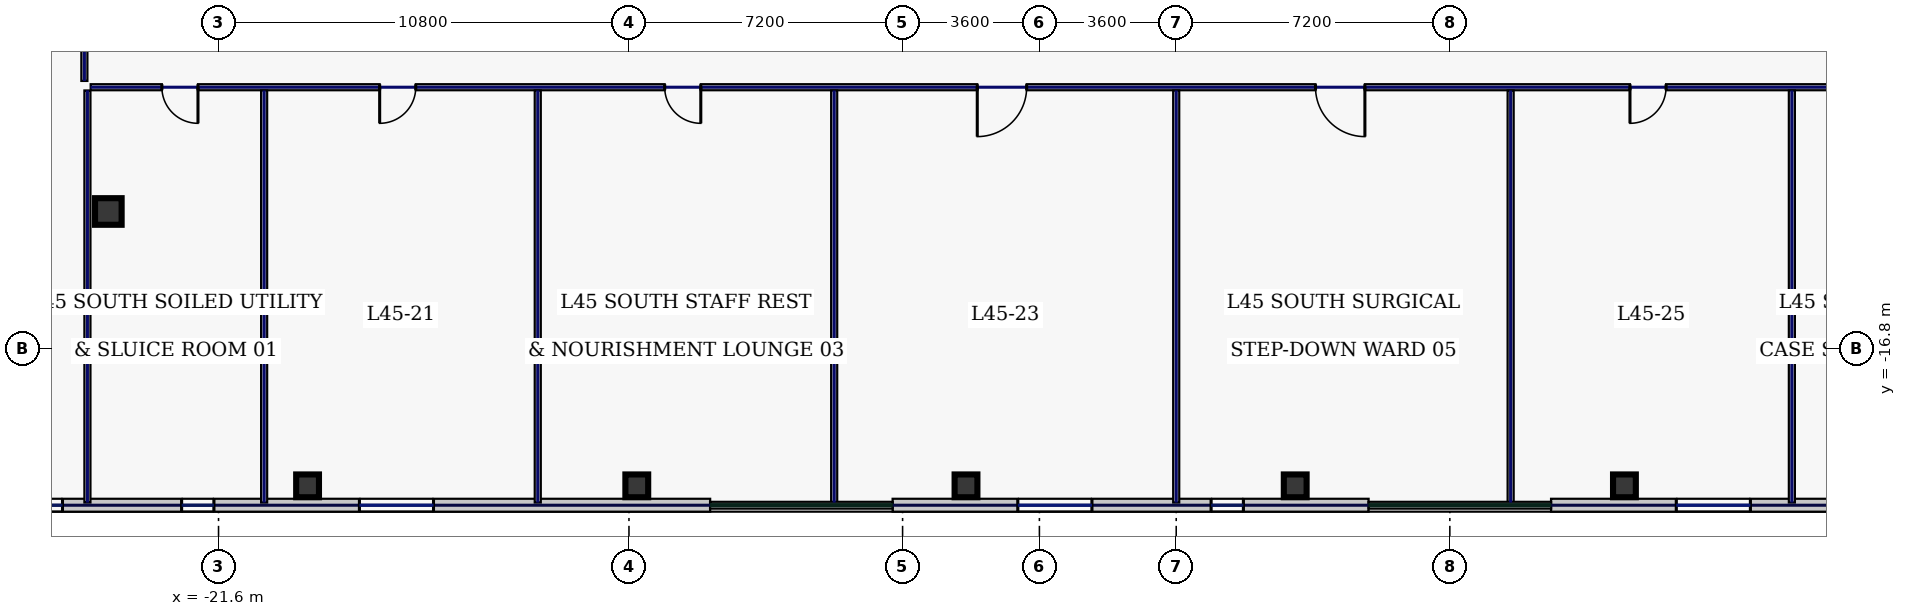
"""IFC4 building model, lengths in metres.
Left out: names, types, materials, properties, quantities, classifications, styles, units other than length and angle.
Written with IfcOpenShell. Run it as: python <this file> out.ifc"""

import sys

from ifc_helpers import new_model, si_unit, direction, frame, frame_2d, origin, origin_2d, place, context, subcontext, project, spatial, rectangle, hollow_rectangle, extrude, element, fill, save


model = new_model("IFC4")
c1 = context("Model", 3, precision=1e-05, world=origin(), true_north=direction((0.0, 1.0)))
c2 = subcontext(c1, "Body", "Model", "MODEL_VIEW")
j1 = project(units=[si_unit("LENGTHUNIT", "METRE"), si_unit("PLANEANGLEUNIT", "RADIAN")], contexts=[c1])
p1 = place(None, origin())
s1 = spatial("IfcSite", under=j1, at=p1, CompositionType="ELEMENT")
p2 = place(p1, origin())
s2 = spatial("IfcBuilding", under=s1, at=p2, CompositionType="ELEMENT")
p3 = place(p2, frame((0.0, 0.0, 196.2)))
s3 = spatial("IfcBuildingStorey", under=s2, at=p3, CompositionType="ELEMENT", Elevation=196.2)
p4 = place(p3, frame((-24.5, -13.2, 0.0), z_axis=(0.0, 0.0, 1.0), x_axis=(1.0, 0.0, 0.0)))
e1 = element("IfcColumn", 1, at=p4, inside=s3, PredefinedType="COLUMN", context=c2, shape_type="SweptSolid", body=[
    extrude(hollow_rectangle(XDim=0.7, YDim=0.7, WallThickness=0.032, at=origin_2d()), origin(), (0.0, 0.0, 1.0), 3.74),
])
for number, where, z_axis, x_axis in (
    (2, (-19.257, -20.42, 0.0), (0.0, 0.0, 1.0), (1.0, 0.0, 0.0)),
    (3, (-10.594, -20.42, 0.0), (0.0, 0.0, 1.0), (1.0, 0.0, 0.0)),
    (4, (-1.931, -20.42, 0.0), (0.0, 0.0, 1.0), (1.0, 0.0, 0.0)),
    (5, (6.731, -20.42, 0.0), (0.0, 0.0, 1.0), (1.0, 0.0, 0.0)),
    (6, (15.394, -20.42, 0.0), (0.0, 0.0, 1.0), (1.0, 0.0, 0.0)),
):
    element("IfcColumn", number, at=place(p3, frame(where, z_axis=z_axis, x_axis=x_axis)), inside=s3, PredefinedType="COLUMN", context=c2, shape_type="SweptSolid", body=[
        extrude(hollow_rectangle(XDim=0.6, YDim=0.6, WallThickness=0.028, at=origin_2d()), origin(), (0.0, 0.0, 1.0), 3.74),
    ])
p5 = place(p3, frame((-28.6, -20.93, 0.0), z_axis=(0.0, 0.0, 1.0), x_axis=(1.0, 0.0, 0.0)))
e7 = element("IfcWall", 7, at=p5, inside=s3, PredefinedType="STANDARD", context=c2, shape_type="SweptSolid", body=[
    extrude(rectangle(XDim=19.937, YDim=0.34, at=frame_2d((9.969, 0.0))), origin(), (0.0, 0.0, 1.0), 3.74),
])
p6 = place(p5, frame((2.044, 0.0, 0.8)))
e8 = element("IfcOpeningElement", 8, at=p6, cuts=e7, PredefinedType="OPENING", context=c2, shape_type="SweptSolid", body=[
    extrude(rectangle(XDim=0.85, YDim=1.85, at=frame_2d((0.425, 0.925))), frame((0.0, 0.18, 0.0), z_axis=(0.0, -1.0, 0.0), x_axis=(1.0, 0.0, 0.0)), (0.0, 0.0, 1.0), 0.36),
])
p7 = place(p5, frame((6.029, 0.0, 0.8)))
e9 = element("IfcOpeningElement", 9, at=p7, cuts=e7, PredefinedType="OPENING", context=c2, shape_type="SweptSolid", body=[
    extrude(rectangle(XDim=0.85, YDim=1.85, at=frame_2d((0.425, 0.925))), frame((0.0, 0.18, 0.0), z_axis=(0.0, -1.0, 0.0), x_axis=(1.0, 0.0, 0.0)), (0.0, 0.0, 1.0), 0.36),
])
p8 = place(p5, frame((10.707, 0.0, 0.8)))
e10 = element("IfcOpeningElement", 10, at=p8, cuts=e7, PredefinedType="OPENING", context=c2, shape_type="SweptSolid", body=[
    extrude(rectangle(XDim=1.95, YDim=2.1, at=frame_2d((0.975, 1.05))), frame((0.0, 0.18, 0.0), z_axis=(0.0, -1.0, 0.0), x_axis=(1.0, 0.0, 0.0)), (0.0, 0.0, 1.0), 0.36),
])
p9 = place(p3, frame((-3.863, -20.93, 0.0), z_axis=(0.0, 0.0, 1.0), x_axis=(1.0, 0.0, 0.0)))
e11 = element("IfcWall", 11, at=p9, inside=s3, PredefinedType="STANDARD", context=c2, shape_type="SweptSolid", body=[
    extrude(rectangle(XDim=12.526, YDim=0.34, at=frame_2d((6.263, 0.0))), origin(), (0.0, 0.0, 1.0), 3.74),
])
p10 = place(p9, frame((3.295, 0.0, 0.8)))
e12 = element("IfcOpeningElement", 12, at=p10, cuts=e11, PredefinedType="OPENING", context=c2, shape_type="SweptSolid", body=[
    extrude(rectangle(XDim=1.95, YDim=2.1, at=frame_2d((0.975, 1.05))), frame((0.0, 0.18, 0.0), z_axis=(0.0, -1.0, 0.0), x_axis=(1.0, 0.0, 0.0)), (0.0, 0.0, 1.0), 0.36),
])
p11 = place(p9, frame((8.38, 0.0, 0.8)))
e13 = element("IfcOpeningElement", 13, at=p11, cuts=e11, PredefinedType="OPENING", context=c2, shape_type="SweptSolid", body=[
    extrude(rectangle(XDim=0.85, YDim=1.85, at=frame_2d((0.425, 0.925))), frame((0.0, 0.18, 0.0), z_axis=(0.0, -1.0, 0.0), x_axis=(1.0, 0.0, 0.0)), (0.0, 0.0, 1.0), 0.36),
])
p12 = place(p3, frame((13.463, -20.93, 0.0), z_axis=(0.0, 0.0, 1.0), x_axis=(1.0, 0.0, 0.0)))
e14 = element("IfcWall", 14, at=p12, inside=s3, PredefinedType="STANDARD", context=c2, shape_type="SweptSolid", body=[
    extrude(rectangle(XDim=19.937, YDim=0.34, at=frame_2d((9.969, 0.0))), origin(), (0.0, 0.0, 1.0), 3.74),
])
p13 = place(p12, frame((3.295, 0.0, 0.8)))
e15 = element("IfcOpeningElement", 15, at=p13, cuts=e14, PredefinedType="OPENING", context=c2, shape_type="SweptSolid", body=[
    extrude(rectangle(XDim=1.95, YDim=2.1, at=frame_2d((0.975, 1.05))), frame((0.0, 0.18, 0.0), z_axis=(0.0, -1.0, 0.0), x_axis=(1.0, 0.0, 0.0)), (0.0, 0.0, 1.0), 0.36),
])
p14 = place(p12, frame((7.28, 0.0, 0.8)))
e16 = element("IfcOpeningElement", 16, at=p14, cuts=e14, PredefinedType="OPENING", context=c2, shape_type="SweptSolid", body=[
    extrude(rectangle(XDim=1.95, YDim=2.1, at=frame_2d((0.975, 1.05))), frame((0.0, 0.18, 0.0), z_axis=(0.0, -1.0, 0.0), x_axis=(1.0, 0.0, 0.0)), (0.0, 0.0, 1.0), 0.36),
])
p15 = place(p12, frame((13.058, 0.0, 0.8)))
e17 = element("IfcOpeningElement", 17, at=p15, cuts=e14, PredefinedType="OPENING", context=c2, shape_type="SweptSolid", body=[
    extrude(rectangle(XDim=0.85, YDim=1.85, at=frame_2d((0.425, 0.925))), frame((0.0, 0.18, 0.0), z_axis=(0.0, -1.0, 0.0), x_axis=(1.0, 0.0, 0.0)), (0.0, 0.0, 1.0), 0.36),
])
p16 = place(p12, frame((15.943, 0.0, 0.8)))
e18 = element("IfcOpeningElement", 18, at=p16, cuts=e14, PredefinedType="OPENING", context=c2, shape_type="SweptSolid", body=[
    extrude(rectangle(XDim=1.95, YDim=2.1, at=frame_2d((0.975, 1.05))), frame((0.0, 0.18, 0.0), z_axis=(0.0, -1.0, 0.0), x_axis=(1.0, 0.0, 0.0)), (0.0, 0.0, 1.0), 0.36),
])
p17 = place(p3, frame((-25.13, -9.765, 0.0), z_axis=(0.0, 0.0, 1.0), x_axis=(0.0, 1.0, 0.0)))
e19 = element("IfcWall", 19, at=p17, inside=s3, PredefinedType="PARTITIONING", context=c2, shape_type="SweptSolid", body=[
    extrude(rectangle(XDim=2.98, YDim=0.16, at=frame_2d((1.49, 0.0))), origin(), (0.0, 0.0, 1.0), 3.74),
])
p18 = place(p17, frame((1.1, 0.0, 0.0)))
e20 = element("IfcOpeningElement", 20, at=p18, cuts=e19, PredefinedType="OPENING", context=c2, shape_type="SweptSolid", body=[
    extrude(rectangle(XDim=0.95, YDim=2.2, at=frame_2d((0.475, 1.1))), frame((0.0, 0.09, 0.0), z_axis=(0.0, -1.0, 0.0), x_axis=(1.0, 0.0, 0.0)), (0.0, 0.0, 1.0), 0.18),
])
p19 = place(p3, frame((24.965, -9.93, 0.0), z_axis=(0.0, 0.0, 1.0), x_axis=(-1.0, 0.0, 0.0)))
e21 = element("IfcWall", 21, at=p19, inside=s3, PredefinedType="PARTITIONING", context=c2, shape_type="SweptSolid", body=[
    extrude(rectangle(XDim=49.93, YDim=0.16, at=frame_2d((24.965, 0.0))), origin(), (0.0, 0.0, 1.0), 3.74),
])
p20 = place(p19, frame((47.106, 0.0, 0.0)))
e22 = element("IfcOpeningElement", 22, at=p20, cuts=e21, PredefinedType="OPENING", context=c2, shape_type="SweptSolid", body=[
    extrude(rectangle(XDim=0.95, YDim=2.2, at=frame_2d((0.475, 1.1))), frame((0.0, 0.09, 0.0), z_axis=(0.0, -1.0, 0.0), x_axis=(1.0, 0.0, 0.0)), (0.0, 0.0, 1.0), 0.18),
])
p21 = place(p19, frame((41.375, 0.0, 0.0)))
e23 = element("IfcOpeningElement", 23, at=p21, cuts=e21, PredefinedType="OPENING", context=c2, shape_type="SweptSolid", body=[
    extrude(rectangle(XDim=0.95, YDim=2.2, at=frame_2d((0.475, 1.1))), frame((0.0, 0.09, 0.0), z_axis=(0.0, -1.0, 0.0), x_axis=(1.0, 0.0, 0.0)), (0.0, 0.0, 1.0), 0.18),
])
p22 = place(p19, frame((33.875, 0.0, 0.0)))
e24 = element("IfcOpeningElement", 24, at=p22, cuts=e21, PredefinedType="OPENING", context=c2, shape_type="SweptSolid", body=[
    extrude(rectangle(XDim=0.95, YDim=2.2, at=frame_2d((0.475, 1.1))), frame((0.0, 0.09, 0.0), z_axis=(0.0, -1.0, 0.0), x_axis=(1.0, 0.0, 0.0)), (0.0, 0.0, 1.0), 0.18),
])
p23 = place(p19, frame((25.3, 0.0, 0.0)))
e25 = element("IfcOpeningElement", 25, at=p23, cuts=e21, PredefinedType="OPENING", context=c2, shape_type="SweptSolid", body=[
    extrude(rectangle(XDim=1.3, YDim=2.2, at=frame_2d((0.65, 1.1))), frame((0.0, 0.09, 0.0), z_axis=(0.0, -1.0, 0.0), x_axis=(1.0, 0.0, 0.0)), (0.0, 0.0, 1.0), 0.18),
])
p24 = place(p19, frame((16.4, 0.0, 0.0)))
e26 = element("IfcOpeningElement", 26, at=p24, cuts=e21, PredefinedType="OPENING", context=c2, shape_type="SweptSolid", body=[
    extrude(rectangle(XDim=1.3, YDim=2.2, at=frame_2d((0.65, 1.1))), frame((0.0, 0.09, 0.0), z_axis=(0.0, -1.0, 0.0), x_axis=(1.0, 0.0, 0.0)), (0.0, 0.0, 1.0), 0.18),
])
p25 = place(p19, frame((8.475, 0.0, 0.0)))
e27 = element("IfcOpeningElement", 27, at=p25, cuts=e21, PredefinedType="OPENING", context=c2, shape_type="SweptSolid", body=[
    extrude(rectangle(XDim=0.95, YDim=2.2, at=frame_2d((0.475, 1.1))), frame((0.0, 0.09, 0.0), z_axis=(0.0, -1.0, 0.0), x_axis=(1.0, 0.0, 0.0)), (0.0, 0.0, 1.0), 0.18),
])
p26 = place(p19, frame((2.344, 0.0, 0.0)))
e28 = element("IfcOpeningElement", 28, at=p26, cuts=e21, PredefinedType="OPENING", context=c2, shape_type="SweptSolid", body=[
    extrude(rectangle(XDim=0.95, YDim=2.2, at=frame_2d((0.475, 1.1))), frame((0.0, 0.09, 0.0), z_axis=(0.0, -1.0, 0.0), x_axis=(1.0, 0.0, 0.0)), (0.0, 0.0, 1.0), 0.18),
])
for number, where, z_axis, x_axis in (
    (29, (-25.05, -20.86, 0.0), (0.0, 0.0, 1.0), (0.0, 1.0, 0.0)),
    (30, (-20.4, -20.86, 0.0), (0.0, 0.0, 1.0), (0.0, 1.0, 0.0)),
    (31, (-13.2, -20.86, 0.0), (0.0, 0.0, 1.0), (0.0, 1.0, 0.0)),
    (32, (-5.4, -20.86, 0.0), (0.0, 0.0, 1.0), (0.0, 1.0, 0.0)),
    (33, (3.6, -20.86, 0.0), (0.0, 0.0, 1.0), (0.0, 1.0, 0.0)),
    (34, (12.4, -20.86, 0.0), (0.0, 0.0, 1.0), (0.0, 1.0, 0.0)),
    (35, (19.8, -20.86, 0.0), (0.0, 0.0, 1.0), (0.0, 1.0, 0.0)),
):
    element("IfcWall", number, at=place(p3, frame(where, z_axis=z_axis, x_axis=x_axis)), inside=s3, PredefinedType="PARTITIONING", context=c2, shape_type="SweptSolid", body=[
        extrude(rectangle(XDim=10.845, YDim=0.16, at=frame_2d((5.423, 0.0))), origin(), (0.0, 0.0, 1.0), 3.74),
    ])
p27 = place(p6, origin())
e36 = element("IfcWindow", 36, at=p27, inside=s3, PartitioningType="SINGLE_PANEL", PredefinedType="WINDOW", context=c2, shape_type="SweptSolid", body=[
    extrude(rectangle(XDim=0.85, YDim=1.85, at=frame_2d((0.425, 0.925))), frame((0.0, 0.03, 0.0), z_axis=(0.0, -1.0, 0.0), x_axis=(1.0, 0.0, 0.0)), (0.0, 0.0, 1.0), 0.06),
])
fill(e8, e36)
p28 = place(p7, origin())
e37 = element("IfcWindow", 37, at=p28, inside=s3, PartitioningType="SINGLE_PANEL", PredefinedType="WINDOW", context=c2, shape_type="SweptSolid", body=[
    extrude(rectangle(XDim=0.85, YDim=1.85, at=frame_2d((0.425, 0.925))), frame((0.0, 0.03, 0.0), z_axis=(0.0, -1.0, 0.0), x_axis=(1.0, 0.0, 0.0)), (0.0, 0.0, 1.0), 0.06),
])
fill(e9, e37)
p29 = place(p8, origin())
e38 = element("IfcWindow", 38, at=p29, inside=s3, PartitioningType="SINGLE_PANEL", PredefinedType="WINDOW", context=c2, shape_type="SweptSolid", body=[
    extrude(rectangle(XDim=1.95, YDim=2.1, at=frame_2d((0.975, 1.05))), frame((0.0, 0.03, 0.0), z_axis=(0.0, -1.0, 0.0), x_axis=(1.0, 0.0, 0.0)), (0.0, 0.0, 1.0), 0.06),
])
fill(e10, e38)
p30 = place(p10, origin())
e39 = element("IfcWindow", 39, at=p30, inside=s3, PartitioningType="SINGLE_PANEL", PredefinedType="WINDOW", context=c2, shape_type="SweptSolid", body=[
    extrude(rectangle(XDim=1.95, YDim=2.1, at=frame_2d((0.975, 1.05))), frame((0.0, 0.03, 0.0), z_axis=(0.0, -1.0, 0.0), x_axis=(1.0, 0.0, 0.0)), (0.0, 0.0, 1.0), 0.06),
])
fill(e12, e39)
p31 = place(p11, origin())
e40 = element("IfcWindow", 40, at=p31, inside=s3, PartitioningType="SINGLE_PANEL", PredefinedType="WINDOW", context=c2, shape_type="SweptSolid", body=[
    extrude(rectangle(XDim=0.85, YDim=1.85, at=frame_2d((0.425, 0.925))), frame((0.0, 0.03, 0.0), z_axis=(0.0, -1.0, 0.0), x_axis=(1.0, 0.0, 0.0)), (0.0, 0.0, 1.0), 0.06),
])
fill(e13, e40)
p32 = place(p13, origin())
e41 = element("IfcWindow", 41, at=p32, inside=s3, PartitioningType="SINGLE_PANEL", PredefinedType="WINDOW", context=c2, shape_type="SweptSolid", body=[
    extrude(rectangle(XDim=1.95, YDim=2.1, at=frame_2d((0.975, 1.05))), frame((0.0, 0.03, 0.0), z_axis=(0.0, -1.0, 0.0), x_axis=(1.0, 0.0, 0.0)), (0.0, 0.0, 1.0), 0.06),
])
fill(e15, e41)
p33 = place(p20, origin())
e42 = element("IfcDoor", 42, at=p33, inside=s3, OperationType="SINGLE_SWING_LEFT", PredefinedType="DOOR", context=c2, shape_type="SweptSolid", body=[
    extrude(rectangle(XDim=0.95, YDim=2.2, at=frame_2d((0.475, 1.1))), frame((0.0, 0.025, 0.0), z_axis=(0.0, -1.0, 0.0), x_axis=(1.0, 0.0, 0.0)), (0.0, 0.0, 1.0), 0.05),
])
fill(e22, e42)
p34 = place(p21, origin())
e43 = element("IfcDoor", 43, at=p34, inside=s3, OperationType="SINGLE_SWING_RIGHT", PredefinedType="DOOR", context=c2, shape_type="SweptSolid", body=[
    extrude(rectangle(XDim=0.95, YDim=2.2, at=frame_2d((0.475, 1.1))), frame((0.0, 0.025, 0.0), z_axis=(0.0, -1.0, 0.0), x_axis=(1.0, 0.0, 0.0)), (0.0, 0.0, 1.0), 0.05),
])
fill(e23, e43)
p35 = place(p22, origin())
e44 = element("IfcDoor", 44, at=p35, inside=s3, OperationType="SINGLE_SWING_LEFT", PredefinedType="DOOR", context=c2, shape_type="SweptSolid", body=[
    extrude(rectangle(XDim=0.95, YDim=2.2, at=frame_2d((0.475, 1.1))), frame((0.0, 0.025, 0.0), z_axis=(0.0, -1.0, 0.0), x_axis=(1.0, 0.0, 0.0)), (0.0, 0.0, 1.0), 0.05),
])
fill(e24, e44)
p36 = place(p23, origin())
e45 = element("IfcDoor", 45, at=p36, inside=s3, OperationType="SINGLE_SWING_RIGHT", PredefinedType="DOOR", context=c2, shape_type="SweptSolid", body=[
    extrude(rectangle(XDim=1.3, YDim=2.2, at=frame_2d((0.65, 1.1))), frame((0.0, 0.025, 0.0), z_axis=(0.0, -1.0, 0.0), x_axis=(1.0, 0.0, 0.0)), (0.0, 0.0, 1.0), 0.05),
])
fill(e25, e45)
p37 = place(p24, origin())
e46 = element("IfcDoor", 46, at=p37, inside=s3, OperationType="SINGLE_SWING_LEFT", PredefinedType="DOOR", context=c2, shape_type="SweptSolid", body=[
    extrude(rectangle(XDim=1.3, YDim=2.2, at=frame_2d((0.65, 1.1))), frame((0.0, 0.025, 0.0), z_axis=(0.0, -1.0, 0.0), x_axis=(1.0, 0.0, 0.0)), (0.0, 0.0, 1.0), 0.05),
])
fill(e26, e46)
p38 = place(p25, origin())
e47 = element("IfcDoor", 47, at=p38, inside=s3, OperationType="SINGLE_SWING_RIGHT", PredefinedType="DOOR", context=c2, shape_type="SweptSolid", body=[
    extrude(rectangle(XDim=0.95, YDim=2.2, at=frame_2d((0.475, 1.1))), frame((0.0, 0.025, 0.0), z_axis=(0.0, -1.0, 0.0), x_axis=(1.0, 0.0, 0.0)), (0.0, 0.0, 1.0), 0.05),
])
fill(e27, e47)
save(model, sys.argv[1])
